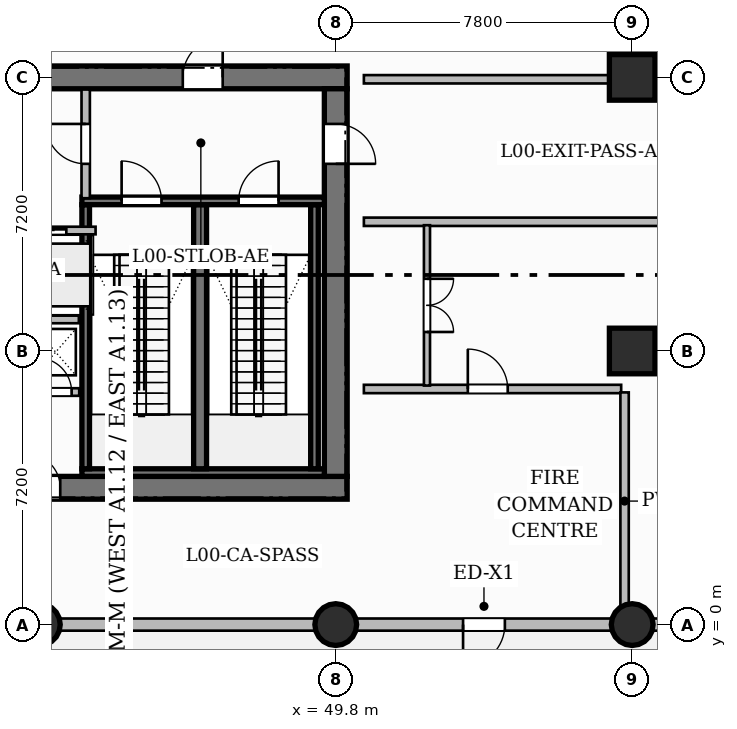
"""IFC4 building model, lengths in metres.
Left out: names, types, materials, properties, quantities, classifications, styles, units other than length and angle.
Written with IfcOpenShell. Run it as: python <this file> out.ifc"""

import sys

from ifc_helpers import new_model, si_unit, direction, frame, frame_2d, origin, origin_2d, place, context, subcontext, project, spatial, rectangle, circle, extrude, source, transform, mapped, element, fill, save


model = new_model("IFC4")
c1 = context("Model", 3, precision=1e-05, world=origin(), true_north=direction((0.0, 1.0)))
c2 = subcontext(c1, "Body", "Model", "MODEL_VIEW")
j1 = project(units=[si_unit("LENGTHUNIT", "METRE"), si_unit("PLANEANGLEUNIT", "RADIAN")], contexts=[c1])
p1 = place(None, origin())
s1 = spatial("IfcSite", under=j1, at=p1, CompositionType="ELEMENT")
p2 = place(p1, origin())
s2 = spatial("IfcBuilding", under=s1, at=p2, CompositionType="ELEMENT")
p3 = place(p2, origin())
s3 = spatial("IfcBuildingStorey", under=s2, at=p3, CompositionType="ELEMENT", Elevation=0.0)
p4 = place(p3, frame((34.5, 3.6, 0.0), z_axis=(0.0, 0.0, 1.0), x_axis=(1.0, 0.0, 0.0)))
e1 = element("IfcWall", 1, at=p4, inside=s3, PredefinedType="SHEAR", context=c2, shape_type="SweptSolid", body=[
    extrude(rectangle(XDim=15.6, YDim=0.6, at=frame_2d((7.8, 0.0))), origin(), (0.0, 0.0, 1.0), 5.4),
])
p5 = place(p4, frame((4.77, 0.0, 0.0)))
e2 = element("IfcOpeningElement", 2, at=p5, cuts=e1, PredefinedType="OPENING", context=c2, shape_type="SweptSolid", body=[
    extrude(rectangle(XDim=0.9, YDim=2.1, at=frame_2d((0.45, 1.05))), frame((0.0, 0.31, 0.0), z_axis=(0.0, -1.0, 0.0), x_axis=(1.0, 0.0, 0.0)), (0.0, 0.0, 1.0), 0.62),
])
p6 = place(p4, frame((7.15, 0.0, 0.0)))
e3 = element("IfcOpeningElement", 3, at=p6, cuts=e1, PredefinedType="OPENING", context=c2, shape_type="SweptSolid", body=[
    extrude(rectangle(XDim=0.9, YDim=2.1, at=frame_2d((0.45, 1.05))), frame((0.0, 0.31, 0.0), z_axis=(0.0, -1.0, 0.0), x_axis=(1.0, 0.0, 0.0)), (0.0, 0.0, 1.0), 0.62),
])
p7 = place(p3, frame((34.5, 14.4, 0.0), z_axis=(0.0, 0.0, 1.0), x_axis=(1.0, 0.0, 0.0)))
e4 = element("IfcWall", 4, at=p7, inside=s3, PredefinedType="SHEAR", context=c2, shape_type="SweptSolid", body=[
    extrude(rectangle(XDim=15.6, YDim=0.6, at=frame_2d((7.8, 0.0))), origin(), (0.0, 0.0, 1.0), 5.4),
])
p8 = place(p7, frame((5.43, 0.0, 0.0)))
e5 = element("IfcOpeningElement", 5, at=p8, cuts=e4, PredefinedType="OPENING", context=c2, shape_type="SweptSolid", body=[
    extrude(rectangle(XDim=1.5, YDim=2.2, at=frame_2d((0.75, 1.1))), frame((0.0, 0.31, 0.0), z_axis=(0.0, -1.0, 0.0), x_axis=(1.0, 0.0, 0.0)), (0.0, 0.0, 1.0), 0.62),
])
p9 = place(p7, frame((1.645, 0.0, 0.0)))
e6 = element("IfcOpeningElement", 6, at=p9, cuts=e4, PredefinedType="OPENING", context=c2, shape_type="SweptSolid", body=[
    extrude(rectangle(XDim=1.05, YDim=2.15, at=frame_2d((0.525, 1.075))), frame((0.0, 0.31, 0.0), z_axis=(0.0, -1.0, 0.0), x_axis=(1.0, 0.0, 0.0)), (0.0, 0.0, 1.0), 0.62),
])
p10 = place(p7, frame((11.275, 0.0, 0.0)))
e7 = element("IfcOpeningElement", 7, at=p10, cuts=e4, PredefinedType="OPENING", context=c2, shape_type="SweptSolid", body=[
    extrude(rectangle(XDim=1.05, YDim=2.15, at=frame_2d((0.525, 1.075))), frame((0.0, 0.31, 0.0), z_axis=(0.0, -1.0, 0.0), x_axis=(1.0, 0.0, 0.0)), (0.0, 0.0, 1.0), 0.62),
])
p11 = place(p3, frame((49.8, 3.9, 0.0), z_axis=(0.0, 0.0, 1.0), x_axis=(0.0, 1.0, 0.0)))
e8 = element("IfcWall", 8, at=p11, inside=s3, PredefinedType="SHEAR", context=c2, shape_type="SweptSolid", body=[
    extrude(rectangle(XDim=10.2, YDim=0.6, at=frame_2d((5.1, 0.0))), origin(), (0.0, 0.0, 1.0), 5.4),
])
p12 = place(p11, frame((8.225, 0.0, 0.0)))
e9 = element("IfcOpeningElement", 9, at=p12, cuts=e8, PredefinedType="OPENING", context=c2, shape_type="SweptSolid", body=[
    extrude(rectangle(XDim=1.05, YDim=2.2, at=frame_2d((0.525, 1.1))), frame((0.0, 0.31, 0.0), z_axis=(0.0, -1.0, 0.0), x_axis=(1.0, 0.0, 0.0)), (0.0, 0.0, 1.0), 0.62),
])
m1 = source(origin(), c2, "Body", "SweptSolid", [
    extrude(circle(Radius=0.55, at=origin_2d()), origin(), (0.0, 0.0, 1.0), 5.4),
])
for number, where, z_axis, x_axis in (
    (10, (42.0, 0.0, 0.0), (0.0, 0.0, 1.0), (1.0, 0.0, 0.0)),
    (11, (49.8, 0.0, 0.0), (0.0, 0.0, 1.0), (1.0, 0.0, 0.0)),
    (12, (57.6, 0.0, 0.0), (0.0, 0.0, 1.0), (1.0, 0.0, 0.0)),
):
    element("IfcColumn", number, at=place(p3, frame(where, z_axis=z_axis, x_axis=x_axis)), inside=s3, PredefinedType="COLUMN", context=c2, shape_type="MappedRepresentation", body=[
        mapped(m1, transform((0.0, 0.0, 0.0), scale=1.0)),
    ])
m2 = source(origin(), c2, "Body", "SweptSolid", [
    extrude(rectangle(XDim=1.2, YDim=1.2, at=origin_2d()), origin(), (0.0, 0.0, 1.0), 5.4),
])
for number, where, z_axis, x_axis in (
    (13, (57.6, 7.2, 0.0), (0.0, 0.0, 1.0), (1.0, 0.0, 0.0)),
    (14, (57.6, 14.4, 0.0), (0.0, 0.0, 1.0), (1.0, 0.0, 0.0)),
):
    element("IfcColumn", number, at=place(p3, frame(where, z_axis=z_axis, x_axis=x_axis)), inside=s3, PredefinedType="COLUMN", context=c2, shape_type="MappedRepresentation", body=[
        mapped(m2, transform((0.0, 0.0, 0.0), scale=1.0)),
    ])
p13 = place(p3, frame((43.12, 4.0, 0.0), z_axis=(0.0, 0.0, 1.0), x_axis=(1.0, 0.0, 0.0)))
e15 = element("IfcWall", 15, at=p13, inside=s3, PredefinedType="SHEAR", context=c2, shape_type="SweptSolid", body=[
    extrude(rectangle(XDim=6.38, YDim=0.2, at=frame_2d((3.19, 0.0))), origin(), (0.0, 0.0, 1.0), 5.4),
])
p14 = place(p3, frame((43.22, 4.1, 0.0), z_axis=(0.0, 0.0, 1.0), x_axis=(0.0, 1.0, 0.0)))
e16 = element("IfcWall", 16, at=p14, inside=s3, PredefinedType="SHEAR", context=c2, shape_type="SweptSolid", body=[
    extrude(rectangle(XDim=6.95, YDim=0.2, at=frame_2d((3.475, 0.0))), origin(), (0.0, 0.0, 1.0), 5.4),
])
p15 = place(p3, frame((46.23, 4.1, 0.0), z_axis=(0.0, 0.0, 1.0), x_axis=(0.0, 1.0, 0.0)))
e17 = element("IfcWall", 17, at=p15, inside=s3, PredefinedType="SHEAR", context=c2, shape_type="SweptSolid", body=[
    extrude(rectangle(XDim=6.95, YDim=0.34, at=frame_2d((3.475, 0.0))), origin(), (0.0, 0.0, 1.0), 5.4),
])
p16 = place(p3, frame((49.24, 4.1, 0.0), z_axis=(0.0, 0.0, 1.0), x_axis=(0.0, 1.0, 0.0)))
e18 = element("IfcWall", 18, at=p16, inside=s3, PredefinedType="SHEAR", context=c2, shape_type="SweptSolid", body=[
    extrude(rectangle(XDim=6.95, YDim=0.2, at=frame_2d((3.475, 0.0))), origin(), (0.0, 0.0, 1.0), 5.4),
])
p17 = place(p3, frame((43.12, 11.15, 0.0), z_axis=(0.0, 0.0, 1.0), x_axis=(1.0, 0.0, 0.0)))
e19 = element("IfcWall", 19, at=p17, inside=s3, PredefinedType="SHEAR", context=c2, shape_type="SweptSolid", body=[
    extrude(rectangle(XDim=6.38, YDim=0.2, at=frame_2d((3.19, 0.0))), origin(), (0.0, 0.0, 1.0), 5.4),
])
p18 = place(p17, frame((1.045, 0.0, 0.0)))
e20 = element("IfcOpeningElement", 20, at=p18, cuts=e19, PredefinedType="OPENING", context=c2, shape_type="SweptSolid", body=[
    extrude(rectangle(XDim=1.05, YDim=2.2, at=frame_2d((0.525, 1.1))), frame((0.0, 0.11, 0.0), z_axis=(0.0, -1.0, 0.0), x_axis=(1.0, 0.0, 0.0)), (0.0, 0.0, 1.0), 0.22),
])
p19 = place(p17, frame((4.125, 0.0, 0.0)))
e21 = element("IfcOpeningElement", 21, at=p19, cuts=e19, PredefinedType="OPENING", context=c2, shape_type="SweptSolid", body=[
    extrude(rectangle(XDim=1.05, YDim=2.2, at=frame_2d((0.525, 1.1))), frame((0.0, 0.11, 0.0), z_axis=(0.0, -1.0, 0.0), x_axis=(1.0, 0.0, 0.0)), (0.0, 0.0, 1.0), 0.22),
])
p20 = place(p3, frame((38.3, 8.03, 0.0), z_axis=(0.0, 0.0, 1.0), x_axis=(1.0, 0.0, 0.0)))
e22 = element("IfcWall", 22, at=p20, inside=s3, PredefinedType="PARTITIONING", context=c2, shape_type="SweptSolid", body=[
    extrude(rectangle(XDim=4.74, YDim=0.2, at=frame_2d((2.37, 0.0))), origin(), (0.0, 0.0, 1.0), 5.1),
])
p21 = place(p3, frame((43.22, 11.22, 0.0), z_axis=(0.0, 0.0, 1.0), x_axis=(0.0, 1.0, 0.0)))
e23 = element("IfcWall", 23, at=p21, inside=s3, PredefinedType="PARTITIONING", context=c2, shape_type="SweptSolid", body=[
    extrude(rectangle(XDim=2.86, YDim=0.22, at=frame_2d((1.43, 0.0))), origin(), (0.0, 0.0, 1.0), 5.1),
])
p22 = place(p21, frame((0.905, 0.0, 0.0)))
e24 = element("IfcOpeningElement", 24, at=p22, cuts=e23, PredefinedType="OPENING", context=c2, shape_type="SweptSolid", body=[
    extrude(rectangle(XDim=1.05, YDim=2.15, at=frame_2d((0.525, 1.075))), frame((0.0, 0.12, 0.0), z_axis=(0.0, -1.0, 0.0), x_axis=(1.0, 0.0, 0.0)), (0.0, 0.0, 1.0), 0.24),
])
p23 = place(p3, frame((41.73, 6.12, 0.0), z_axis=(0.0, 0.0, 1.0), x_axis=(1.0, 0.0, 0.0)))
e25 = element("IfcWall", 25, at=p23, inside=s3, PredefinedType="PARTITIONING", context=c2, shape_type="SweptSolid", body=[
    extrude(rectangle(XDim=1.32, YDim=0.2, at=frame_2d((0.66, 0.0))), origin(), (0.0, 0.0, 1.0), 5.1),
])
p24 = place(p23, frame((0.22, 0.0, 0.0)))
e26 = element("IfcOpeningElement", 26, at=p24, cuts=e25, PredefinedType="OPENING", context=c2, shape_type="SweptSolid", body=[
    extrude(rectangle(XDim=0.9, YDim=2.1, at=frame_2d((0.45, 1.05))), frame((0.0, 0.11, 0.0), z_axis=(0.0, -1.0, 0.0), x_axis=(1.0, 0.0, 0.0)), (0.0, 0.0, 1.0), 0.22),
])
p25 = place(p3, frame((50.54, 10.6, 0.0), z_axis=(0.0, 0.0, 1.0), x_axis=(1.0, 0.0, 0.0)))
e27 = element("IfcWall", 27, at=p25, inside=s3, PredefinedType="PARTITIONING", context=c2, shape_type="SweptSolid", body=[
    extrude(rectangle(XDim=29.692, YDim=0.22, at=frame_2d((14.846, 0.0))), origin(), (0.0, 0.0, 1.0), 5.1),
])
p26 = place(p25, frame((13.71, 0.0, 0.0)))
e28 = element("IfcOpeningElement", 28, at=p26, cuts=e27, PredefinedType="OPENING", context=c2, shape_type="SweptSolid", body=[
    extrude(rectangle(XDim=1.5, YDim=2.2, at=frame_2d((0.75, 1.1))), frame((0.0, 0.12, 0.0), z_axis=(0.0, -1.0, 0.0), x_axis=(1.0, 0.0, 0.0)), (0.0, 0.0, 1.0), 0.24),
])
p27 = place(p3, frame((50.54, 14.35, 0.0), z_axis=(0.0, 0.0, 1.0), x_axis=(1.0, 0.0, 0.0)))
e29 = element("IfcWall", 29, at=p27, inside=s3, PredefinedType="PARTITIONING", context=c2, shape_type="SweptSolid", body=[
    extrude(rectangle(XDim=29.692, YDim=0.22, at=frame_2d((14.846, 0.0))), origin(), (0.0, 0.0, 1.0), 4.085),
])
p28 = place(p27, frame((10.435, 0.0, 0.0)))
e30 = element("IfcOpeningElement", 30, at=p28, cuts=e29, PredefinedType="OPENING", context=c2, shape_type="SweptSolid", body=[
    extrude(rectangle(XDim=1.05, YDim=2.15, at=frame_2d((0.525, 1.075))), frame((0.0, 0.12, 0.0), z_axis=(0.0, -1.0, 0.0), x_axis=(1.0, 0.0, 0.0)), (0.0, 0.0, 1.0), 0.24),
])
p29 = place(p3, frame((50.54, 6.2, 0.0), z_axis=(0.0, 0.0, 1.0), x_axis=(1.0, 0.0, 0.0)))
e31 = element("IfcWall", 31, at=p29, inside=s3, PredefinedType="PARTITIONING", context=c2, shape_type="SweptSolid", body=[
    extrude(rectangle(XDim=6.77, YDim=0.22, at=frame_2d((3.385, 0.0))), origin(), (0.0, 0.0, 1.0), 5.1),
])
p30 = place(p29, frame((2.735, 0.0, 0.0)))
e32 = element("IfcOpeningElement", 32, at=p30, cuts=e31, PredefinedType="OPENING", context=c2, shape_type="SweptSolid", body=[
    extrude(rectangle(XDim=1.05, YDim=2.15, at=frame_2d((0.525, 1.075))), frame((0.0, 0.12, 0.0), z_axis=(0.0, -1.0, 0.0), x_axis=(1.0, 0.0, 0.0)), (0.0, 0.0, 1.0), 0.24),
])
p31 = place(p3, frame((57.4, 0.39, 0.0), z_axis=(0.0, 0.0, 1.0), x_axis=(0.0, 1.0, 0.0)))
e33 = element("IfcWall", 33, at=p31, inside=s3, PredefinedType="PARTITIONING", context=c2, shape_type="SweptSolid", body=[
    extrude(rectangle(XDim=5.72, YDim=0.22, at=frame_2d((2.86, 0.0))), origin(), (0.0, 0.0, 1.0), 4.085),
])
p32 = place(p3, frame((52.2, 10.51, 0.0), z_axis=(0.0, 0.0, 1.0), x_axis=(0.0, -1.0, 0.0)))
e34 = element("IfcWall", 34, at=p32, inside=s3, PredefinedType="PARTITIONING", context=c2, shape_type="SweptSolid", body=[
    extrude(rectangle(XDim=4.22, YDim=0.16, at=frame_2d((2.11, 0.0))), origin(), (0.0, 0.0, 1.0), 5.1),
])
p33 = place(p32, frame((1.41, 0.0, 0.0)))
e35 = element("IfcOpeningElement", 35, at=p33, cuts=e34, PredefinedType="OPENING", context=c2, shape_type="SweptSolid", body=[
    extrude(rectangle(XDim=1.4, YDim=2.35, at=frame_2d((0.7, 1.175))), frame((0.0, 0.09, 0.0), z_axis=(0.0, -1.0, 0.0), x_axis=(1.0, 0.0, 0.0)), (0.0, 0.0, 1.0), 0.18),
])
p34 = place(p3, frame((40.84, 10.37, 0.0), z_axis=(0.0, 0.0, 1.0), x_axis=(1.0, 0.0, 0.0)))
e36 = element("IfcWall", 36, at=p34, inside=s3, PredefinedType="PARTITIONING", context=c2, shape_type="SweptSolid", body=[
    extrude(rectangle(XDim=2.64, YDim=0.2, at=frame_2d((1.32, 0.0))), origin(), (0.0, 0.0, 1.0), 5.1),
])
p35 = place(p34, frame((0.77, 0.0, 0.0)))
e37 = element("IfcOpeningElement", 37, at=p35, cuts=e36, PredefinedType="OPENING", context=c2, shape_type="SweptSolid", body=[
    extrude(rectangle(XDim=1.1, YDim=2.2, at=frame_2d((0.55, 1.1))), frame((0.0, 0.11, 0.0), z_axis=(0.0, -1.0, 0.0), x_axis=(1.0, 0.0, 0.0)), (0.0, 0.0, 1.0), 0.22),
])
p36 = place(p3, frame((28.35, 0.0, 0.0), z_axis=(0.0, 0.0, 1.0), x_axis=(1.0, 0.0, 0.0)))
e38 = element("IfcWall", 38, at=p36, inside=s3, PredefinedType="SOLIDWALL", context=c2, shape_type="SweptSolid", body=[
    extrude(rectangle(XDim=52.05, YDim=0.32, at=frame_2d((26.025, 0.0))), origin(), (0.0, 0.0, 1.0), 4.085),
])
p37 = place(p36, frame((24.8, 0.0, 0.0)))
e39 = element("IfcOpeningElement", 39, at=p37, cuts=e38, PredefinedType="OPENING", context=c2, shape_type="SweptSolid", body=[
    extrude(rectangle(XDim=1.1, YDim=2.2, at=frame_2d((0.55, 1.1))), frame((0.0, 0.17, 0.0), z_axis=(0.0, -1.0, 0.0), x_axis=(1.0, 0.0, 0.0)), (0.0, 0.0, 1.0), 0.34),
])
p38 = place(p36, frame((33.65, 0.0, 0.0)))
e40 = element("IfcOpeningElement", 40, at=p38, cuts=e38, PredefinedType="OPENING", context=c2, shape_type="SweptSolid", body=[
    extrude(rectangle(XDim=2.4, YDim=2.8, at=frame_2d((1.2, 1.4))), frame((0.0, 0.17, 0.0), z_axis=(0.0, -1.0, 0.0), x_axis=(1.0, 0.0, 0.0)), (0.0, 0.0, 1.0), 0.34),
])
m3 = source(origin(), c2, "Body", "SweptSolid", [
    extrude(rectangle(XDim=1.05, YDim=2.2, at=frame_2d((0.525, 1.1))), frame((0.0, 0.025, 0.0), z_axis=(0.0, -1.0, 0.0), x_axis=(1.0, 0.0, 0.0)), (0.0, 0.0, 1.0), 0.05),
])
p39 = place(p18, origin())
e41 = element("IfcDoor", 41, at=p39, inside=s3, OperationType="SINGLE_SWING_LEFT", PredefinedType="DOOR", context=c2, shape_type="MappedRepresentation", body=[
    mapped(m3, transform((0.0, 0.0, 0.0), scale=1.0)),
])
fill(e20, e41)
p40 = place(p19, origin())
e42 = element("IfcDoor", 42, at=p40, inside=s3, OperationType="SINGLE_SWING_RIGHT", PredefinedType="DOOR", context=c2, shape_type="MappedRepresentation", body=[
    mapped(m3, transform((0.0, 0.0, 0.0), scale=1.0)),
])
fill(e21, e42)
m4 = source(origin(), c2, "Body", "SweptSolid", [
    extrude(rectangle(XDim=1.05, YDim=2.15, at=frame_2d((0.525, 1.075))), frame((0.0, 0.025, 0.0), z_axis=(0.0, -1.0, 0.0), x_axis=(1.0, 0.0, 0.0)), (0.0, 0.0, 1.0), 0.05),
])
p41 = place(p22, origin())
e43 = element("IfcDoor", 43, at=p41, inside=s3, OperationType="SINGLE_SWING_RIGHT", PredefinedType="DOOR", context=c2, shape_type="MappedRepresentation", body=[
    mapped(m4, transform((0.0, 0.0, 0.0), scale=1.0)),
])
fill(e24, e43)
p42 = place(p10, origin())
e44 = element("IfcDoor", 44, at=p42, inside=s3, OperationType="SINGLE_SWING_RIGHT", PredefinedType="DOOR", context=c2, shape_type="MappedRepresentation", body=[
    mapped(m4, transform((0.0, 0.0, 0.0), scale=1.0)),
])
fill(e7, e44)
p43 = place(p12, frame((1.05, 0.0, 0.0), z_axis=(0.0, 0.0, 1.0), x_axis=(-1.0, 0.0, 0.0)))
e45 = element("IfcDoor", 45, at=p43, inside=s3, OperationType="SINGLE_SWING_LEFT", PredefinedType="DOOR", context=c2, shape_type="MappedRepresentation", body=[
    mapped(m3, transform((0.0, 0.0, 0.0), scale=1.0)),
])
fill(e9, e45)
m5 = source(origin(), c2, "Body", "SweptSolid", [
    extrude(rectangle(XDim=0.9, YDim=2.1, at=frame_2d((0.45, 1.05))), frame((0.0, 0.025, 0.0), z_axis=(0.0, -1.0, 0.0), x_axis=(1.0, 0.0, 0.0)), (0.0, 0.0, 1.0), 0.05),
])
p44 = place(p24, origin())
e46 = element("IfcDoor", 46, at=p44, inside=s3, OperationType="SINGLE_SWING_LEFT", PredefinedType="DOOR", context=c2, shape_type="MappedRepresentation", body=[
    mapped(m5, transform((0.0, 0.0, 0.0), scale=1.0)),
])
fill(e26, e46)
p45 = place(p6, origin())
e47 = element("IfcDoor", 47, at=p45, inside=s3, OperationType="SINGLE_SWING_LEFT", PredefinedType="DOOR", context=c2, shape_type="MappedRepresentation", body=[
    mapped(m5, transform((0.0, 0.0, 0.0), scale=1.0)),
])
fill(e3, e47)
p46 = place(p30, origin())
e48 = element("IfcDoor", 48, at=p46, inside=s3, OperationType="SINGLE_SWING_LEFT", PredefinedType="DOOR", context=c2, shape_type="MappedRepresentation", body=[
    mapped(m4, transform((0.0, 0.0, 0.0), scale=1.0)),
])
fill(e32, e48)
m6 = source(origin(), c2, "Body", "SweptSolid", [
    extrude(rectangle(XDim=1.4, YDim=2.35, at=frame_2d((0.7, 1.175))), frame((0.0, 0.025, 0.0), z_axis=(0.0, -1.0, 0.0), x_axis=(1.0, 0.0, 0.0)), (0.0, 0.0, 1.0), 0.05),
])
p47 = place(p33, origin())
e49 = element("IfcDoor", 49, at=p47, inside=s3, OperationType="DOUBLE_DOOR_SINGLE_SWING", PredefinedType="DOOR", context=c2, shape_type="MappedRepresentation", body=[
    mapped(m6, transform((0.0, 0.0, 0.0), scale=1.0)),
])
fill(e35, e49)
m7 = source(origin(), c2, "Body", "SweptSolid", [
    extrude(rectangle(XDim=1.1, YDim=2.2, at=frame_2d((0.55, 1.1))), frame((0.0, 0.025, 0.0), z_axis=(0.0, -1.0, 0.0), x_axis=(1.0, 0.0, 0.0)), (0.0, 0.0, 1.0), 0.05),
])
p48 = place(p35, origin())
e50 = element("IfcDoor", 50, at=p48, inside=s3, OperationType="SLIDING_TO_LEFT", PredefinedType="DOOR", context=c2, shape_type="MappedRepresentation", body=[
    mapped(m7, transform((0.0, 0.0, 0.0), scale=1.0)),
])
fill(e37, e50)
m8 = source(origin(), c2, "Body", "SweptSolid", [
    extrude(rectangle(XDim=1.1, YDim=2.2, at=frame_2d((0.55, 1.1))), frame((0.0, 0.025, 0.0), z_axis=(0.0, -1.0, 0.0), x_axis=(1.0, 0.0, 0.0)), (0.0, 0.0, 1.0), 0.05),
])
p49 = place(p37, frame((1.1, 0.0, 0.0), z_axis=(0.0, 0.0, 1.0), x_axis=(-1.0, 0.0, 0.0)))
e51 = element("IfcDoor", 51, at=p49, inside=s3, OperationType="SINGLE_SWING_LEFT", PredefinedType="DOOR", context=c2, shape_type="MappedRepresentation", body=[
    mapped(m8, transform((0.0, 0.0, 0.0), scale=1.0)),
])
fill(e39, e51)
save(model, sys.argv[1])
